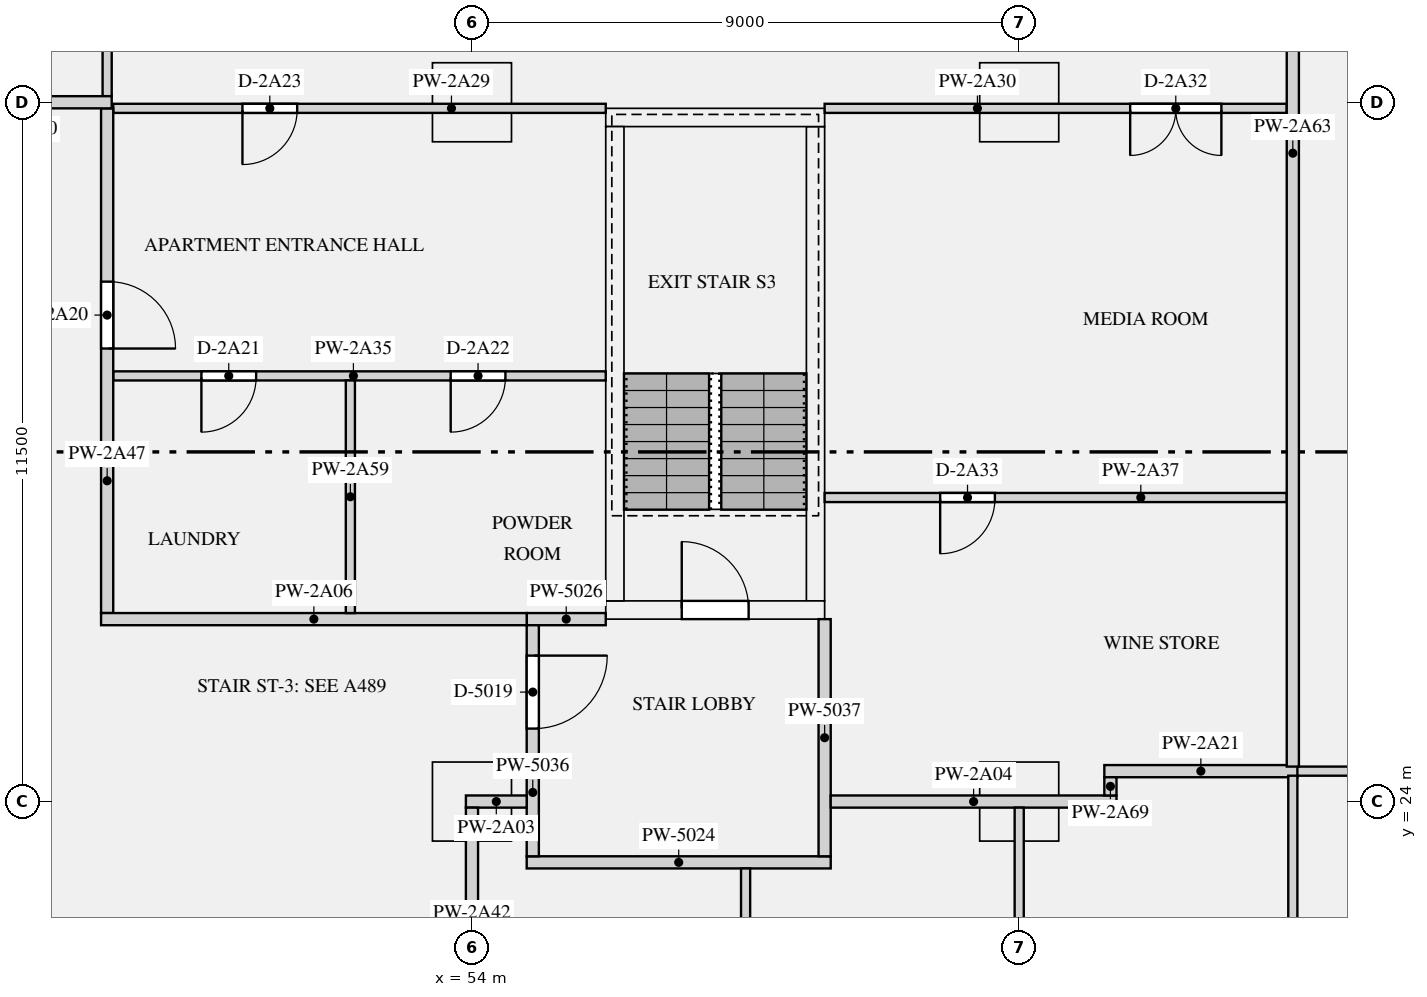
"""IFC4 building model, lengths in metres.
Left out: names, types, materials, properties, quantities, classifications, styles, units other than length and angle.
Written with IfcOpenShell. Run it as: python <this file> out.ifc"""

import sys

from ifc_helpers import new_model, si_unit, direction, frame, frame_2d, origin, origin_2d, place, context, subcontext, project, spatial, rectangle, extrude, element, fill, save


model = new_model("IFC4")
c1 = context("Model", 3, precision=1e-05, world=origin(), true_north=direction((0.0, 1.0)))
c2 = subcontext(c1, "Body", "Model", "MODEL_VIEW")
j1 = project(units=[si_unit("LENGTHUNIT", "METRE"), si_unit("PLANEANGLEUNIT", "RADIAN")], contexts=[c1])
p1 = place(None, origin())
s1 = spatial("IfcSite", under=j1, at=p1, CompositionType="ELEMENT")
p2 = place(p1, origin())
s2 = spatial("IfcBuilding", under=s1, at=p2, CompositionType="ELEMENT")
p3 = place(p2, frame((0.0, 0.0, 83.55)))
s3 = spatial("IfcBuildingStorey", under=s2, at=p3, CompositionType="ELEMENT", Elevation=83.55)
for number, where, z_axis, x_axis in (
    (1, (54.0, 24.0, 0.0), (0.0, 0.0, 1.0), (1.0, 0.0, 0.0)),
    (2, (63.0, 24.0, 0.0), (0.0, 0.0, 1.0), (1.0, 0.0, 0.0)),
    (3, (54.0, 35.5, 0.0), (0.0, 0.0, 1.0), (1.0, 0.0, 0.0)),
    (4, (63.0, 35.5, 0.0), (0.0, 0.0, 1.0), (1.0, 0.0, 0.0)),
):
    element("IfcColumn", number, at=place(p3, frame(where, z_axis=z_axis, x_axis=x_axis)), inside=s3, PredefinedType="COLUMN", context=c2, shape_type="SweptSolid", body=[
        extrude(rectangle(XDim=1.3, YDim=1.3, at=origin_2d()), origin(), (0.0, 0.0, 1.0), 3.15),
    ])
p4 = place(p3, frame((56.2, 27.15, 0.0), z_axis=(0.0, 0.0, 1.0), x_axis=(1.0, 0.0, 0.0)))
e5 = element("IfcWall", 5, at=p4, inside=s3, PredefinedType="SHEAR", context=c2, shape_type="SweptSolid", body=[
    extrude(rectangle(XDim=3.6, YDim=0.3, at=frame_2d((1.8, 0.0))), origin(), (0.0, 0.0, 1.0), 3.15),
])
p5 = place(p4, frame((1.25, 0.0, 0.0)))
e6 = element("IfcOpeningElement", 6, at=p5, cuts=e5, PredefinedType="OPENING", context=c2, shape_type="SweptSolid", body=[
    extrude(rectangle(XDim=1.1, YDim=2.1, at=frame_2d((0.55, 1.05))), frame((0.0, 0.16, 0.0), z_axis=(0.0, -1.0, 0.0), x_axis=(1.0, 0.0, 0.0)), (0.0, 0.0, 1.0), 0.32),
])
p6 = place(p3, frame((56.2, 35.25, 0.0), z_axis=(0.0, 0.0, 1.0), x_axis=(1.0, 0.0, 0.0)))
e7 = element("IfcWall", 7, at=p6, inside=s3, PredefinedType="SHEAR", context=c2, shape_type="SweptSolid", body=[
    extrude(rectangle(XDim=3.6, YDim=0.3, at=frame_2d((1.8, 0.0))), origin(), (0.0, 0.0, 1.0), 3.15),
])
for number, where, z_axis, x_axis in (
    (8, (56.35, 27.3, 0.0), (0.0, 0.0, 1.0), (0.0, 1.0, 0.0)),
    (9, (59.65, 27.3, 0.0), (0.0, 0.0, 1.0), (0.0, 1.0, 0.0)),
):
    element("IfcWall", number, at=place(p3, frame(where, z_axis=z_axis, x_axis=x_axis)), inside=s3, PredefinedType="SHEAR", context=c2, shape_type="SweptSolid", body=[
        extrude(rectangle(XDim=7.8, YDim=0.3, at=frame_2d((3.9, 0.0))), origin(), (0.0, 0.0, 1.0), 3.15),
    ])
p7 = place(p3, frame((54.9, 23.0, 0.0), z_axis=(0.0, 0.0, 1.0), x_axis=(1.0, 0.0, 0.0)))
e10 = element("IfcWall", 10, at=p7, inside=s3, PredefinedType="PARTITIONING", context=c2, shape_type="SweptSolid", body=[
    extrude(rectangle(XDim=5.0, YDim=0.2, at=frame_2d((2.5, 0.0))), origin(), (0.0, 0.0, 1.0), 2.83),
])
p8 = place(p3, frame((54.9, 27.0, 0.0), z_axis=(0.0, 0.0, 1.0), x_axis=(1.0, 0.0, 0.0)))
e11 = element("IfcWall", 11, at=p8, inside=s3, PredefinedType="PARTITIONING", context=c2, shape_type="SweptSolid", body=[
    extrude(rectangle(XDim=1.3, YDim=0.2, at=frame_2d((0.65, 0.0))), origin(), (0.0, 0.0, 1.0), 2.83),
])
p9 = place(p3, frame((55.0, 23.1, 0.0), z_axis=(0.0, 0.0, 1.0), x_axis=(0.0, 1.0, 0.0)))
e12 = element("IfcWall", 12, at=p9, inside=s3, PredefinedType="PARTITIONING", context=c2, shape_type="SweptSolid", body=[
    extrude(rectangle(XDim=3.8, YDim=0.2, at=frame_2d((1.9, 0.0))), origin(), (0.0, 0.0, 1.0), 2.83),
])
p10 = place(p9, frame((2.1, 0.0, 0.0)))
e13 = element("IfcOpeningElement", 13, at=p10, cuts=e12, PredefinedType="OPENING", context=c2, shape_type="SweptSolid", body=[
    extrude(rectangle(XDim=1.2, YDim=2.1, at=frame_2d((0.6, 1.05))), frame((0.0, 0.11, 0.0), z_axis=(0.0, -1.0, 0.0), x_axis=(1.0, 0.0, 0.0)), (0.0, 0.0, 1.0), 0.22),
])
p11 = place(p3, frame((59.8, 23.1, 0.0), z_axis=(0.0, 0.0, 1.0), x_axis=(0.0, 1.0, 0.0)))
e14 = element("IfcWall", 14, at=p11, inside=s3, PredefinedType="PARTITIONING", context=c2, shape_type="SweptSolid", body=[
    extrude(rectangle(XDim=3.9, YDim=0.2, at=frame_2d((1.95, 0.0))), origin(), (0.0, 0.0, 1.0), 2.83),
])
p12 = place(p3, frame((53.9, 24.0, 0.0), z_axis=(0.0, 0.0, 1.0), x_axis=(1.0, 0.0, 0.0)))
e15 = element("IfcWall", 15, at=p12, inside=s3, PredefinedType="PARTITIONING", context=c2, shape_type="SweptSolid", body=[
    extrude(rectangle(XDim=1.0, YDim=0.2, at=frame_2d((0.5, 0.0))), origin(), (0.0, 0.0, 1.0), 2.83),
])
p13 = place(p3, frame((59.9, 24.0, 0.0), z_axis=(0.0, 0.0, 1.0), x_axis=(1.0, 0.0, 0.0)))
e16 = element("IfcWall", 16, at=p13, inside=s3, PredefinedType="PARTITIONING", context=c2, shape_type="SweptSolid", body=[
    extrude(rectangle(XDim=4.7, YDim=0.2, at=frame_2d((2.35, 0.0))), origin(), (0.0, 0.0, 1.0), 2.83),
])
p14 = place(p3, frame((47.9, 27.0, 0.0), z_axis=(0.0, 0.0, 1.0), x_axis=(1.0, 0.0, 0.0)))
e17 = element("IfcWall", 17, at=p14, inside=s3, PredefinedType="PARTITIONING", context=c2, shape_type="SweptSolid", body=[
    extrude(rectangle(XDim=7.0, YDim=0.2, at=frame_2d((3.5, 0.0))), origin(), (0.0, 0.0, 1.0), 2.83),
])
p15 = place(p3, frame((45.0, 35.5, 0.0), z_axis=(0.0, 0.0, 1.0), x_axis=(1.0, 0.0, 0.0)))
e18 = element("IfcWall", 18, at=p15, inside=s3, PredefinedType="PARTITIONING", context=c2, shape_type="SweptSolid", body=[
    extrude(rectangle(XDim=3.075, YDim=0.2, at=frame_2d((1.538, 0.0))), origin(), (0.0, 0.0, 1.0), 2.83),
])
p16 = place(p3, frame((67.425, 24.5, 0.0), z_axis=(0.0, 0.0, 1.0), x_axis=(1.0, 0.0, 0.0)))
e19 = element("IfcWall", 19, at=p16, inside=s3, PredefinedType="PARTITIONING", context=c2, shape_type="SweptSolid", body=[
    extrude(rectangle(XDim=4.65, YDim=0.15, at=frame_2d((2.325, 0.0))), origin(), (0.0, 0.0, 1.0), 2.83),
])
p17 = place(p16, frame((1.25, 0.0, 0.0)))
e20 = element("IfcOpeningElement", 20, at=p17, cuts=e19, PredefinedType="OPENING", context=c2, shape_type="SweptSolid", body=[
    extrude(rectangle(XDim=1.5, YDim=2.1, at=frame_2d((0.75, 1.05))), frame((0.0, 0.085, 0.0), z_axis=(0.0, -1.0, 0.0), x_axis=(1.0, 0.0, 0.0)), (0.0, 0.0, 1.0), 0.17),
])
p18 = place(p3, frame((64.4, 24.5, 0.0), z_axis=(0.0, 0.0, 1.0), x_axis=(1.0, 0.0, 0.0)))
e21 = element("IfcWall", 21, at=p18, inside=s3, PredefinedType="PARTITIONING", context=c2, shape_type="SweptSolid", body=[
    extrude(rectangle(XDim=3.175, YDim=0.2, at=frame_2d((1.587, 0.0))), origin(), (0.0, 0.0, 1.0), 2.83),
])
p19 = place(p3, frame((48.1, 35.4, 0.0), z_axis=(0.0, 0.0, 1.0), x_axis=(1.0, 0.0, 0.0)))
e22 = element("IfcWall", 22, at=p19, inside=s3, PredefinedType="PARTITIONING", context=c2, shape_type="SweptSolid", body=[
    extrude(rectangle(XDim=8.1, YDim=0.15, at=frame_2d((4.05, 0.0))), origin(), (0.0, 0.0, 1.0), 2.83),
])
p20 = place(p19, frame((2.125, 0.0, 0.0)))
e23 = element("IfcOpeningElement", 23, at=p20, cuts=e22, PredefinedType="OPENING", context=c2, shape_type="SweptSolid", body=[
    extrude(rectangle(XDim=0.9, YDim=2.1, at=frame_2d((0.45, 1.05))), frame((0.0, 0.085, 0.0), z_axis=(0.0, -1.0, 0.0), x_axis=(1.0, 0.0, 0.0)), (0.0, 0.0, 1.0), 0.17),
])
p21 = place(p3, frame((59.8, 35.4, 0.0), z_axis=(0.0, 0.0, 1.0), x_axis=(1.0, 0.0, 0.0)))
e24 = element("IfcWall", 24, at=p21, inside=s3, PredefinedType="PARTITIONING", context=c2, shape_type="SweptSolid", body=[
    extrude(rectangle(XDim=7.6, YDim=0.15, at=frame_2d((3.8, 0.0))), origin(), (0.0, 0.0, 1.0), 2.83),
])
p22 = place(p21, frame((5.025, 0.0, 0.0)))
e25 = element("IfcOpeningElement", 25, at=p22, cuts=e24, PredefinedType="OPENING", context=c2, shape_type="SweptSolid", body=[
    extrude(rectangle(XDim=1.5, YDim=2.1, at=frame_2d((0.75, 1.05))), frame((0.0, 0.085, 0.0), z_axis=(0.0, -1.0, 0.0), x_axis=(1.0, 0.0, 0.0)), (0.0, 0.0, 1.0), 0.17),
])
p23 = place(p3, frame((48.1, 31.0, 0.0), z_axis=(0.0, 0.0, 1.0), x_axis=(1.0, 0.0, 0.0)))
e26 = element("IfcWall", 26, at=p23, inside=s3, PredefinedType="PARTITIONING", context=c2, shape_type="SweptSolid", body=[
    extrude(rectangle(XDim=8.1, YDim=0.15, at=frame_2d((4.05, 0.0))), origin(), (0.0, 0.0, 1.0), 2.83),
])
p24 = place(p23, frame((1.45, 0.0, 0.0)))
e27 = element("IfcOpeningElement", 27, at=p24, cuts=e26, PredefinedType="OPENING", context=c2, shape_type="SweptSolid", body=[
    extrude(rectangle(XDim=0.9, YDim=2.1, at=frame_2d((0.45, 1.05))), frame((0.0, 0.085, 0.0), z_axis=(0.0, -1.0, 0.0), x_axis=(1.0, 0.0, 0.0)), (0.0, 0.0, 1.0), 0.17),
])
p25 = place(p23, frame((5.55, 0.0, 0.0)))
e28 = element("IfcOpeningElement", 28, at=p25, cuts=e26, PredefinedType="OPENING", context=c2, shape_type="SweptSolid", body=[
    extrude(rectangle(XDim=0.9, YDim=2.1, at=frame_2d((0.45, 1.05))), frame((0.0, 0.085, 0.0), z_axis=(0.0, -1.0, 0.0), x_axis=(1.0, 0.0, 0.0)), (0.0, 0.0, 1.0), 0.17),
])
p26 = place(p3, frame((59.8, 29.0, 0.0), z_axis=(0.0, 0.0, 1.0), x_axis=(1.0, 0.0, 0.0)))
e29 = element("IfcWall", 29, at=p26, inside=s3, PredefinedType="PARTITIONING", context=c2, shape_type="SweptSolid", body=[
    extrude(rectangle(XDim=7.6, YDim=0.15, at=frame_2d((3.8, 0.0))), origin(), (0.0, 0.0, 1.0), 2.83),
])
p27 = place(p26, frame((1.9, 0.0, 0.0)))
e30 = element("IfcOpeningElement", 30, at=p27, cuts=e29, PredefinedType="OPENING", context=c2, shape_type="SweptSolid", body=[
    extrude(rectangle(XDim=0.9, YDim=2.1, at=frame_2d((0.45, 1.05))), frame((0.0, 0.085, 0.0), z_axis=(0.0, -1.0, 0.0), x_axis=(1.0, 0.0, 0.0)), (0.0, 0.0, 1.0), 0.17),
])
p28 = place(p3, frame((54.0, 16.1, 0.0), z_axis=(0.0, 0.0, 1.0), x_axis=(0.0, 1.0, 0.0)))
e31 = element("IfcWall", 31, at=p28, inside=s3, PredefinedType="PARTITIONING", context=c2, shape_type="SweptSolid", body=[
    extrude(rectangle(XDim=7.8, YDim=0.2, at=frame_2d((3.9, 0.0))), origin(), (0.0, 0.0, 1.0), 2.83),
])
p29 = place(p28, frame((2.35, 0.0, 0.0)))
e32 = element("IfcOpeningElement", 32, at=p29, cuts=e31, PredefinedType="OPENING", context=c2, shape_type="SweptSolid", body=[
    extrude(rectangle(XDim=1.1, YDim=2.1, at=frame_2d((0.55, 1.05))), frame((0.0, 0.11, 0.0), z_axis=(0.0, -1.0, 0.0), x_axis=(1.0, 0.0, 0.0)), (0.0, 0.0, 1.0), 0.22),
])
p30 = place(p3, frame((48.0, 35.6, 0.0), z_axis=(0.0, 0.0, 1.0), x_axis=(0.0, 1.0, 0.0)))
e33 = element("IfcWall", 33, at=p30, inside=s3, PredefinedType="PARTITIONING", context=c2, shape_type="SweptSolid", body=[
    extrude(rectangle(XDim=3.125, YDim=0.15, at=frame_2d((1.562, 0.0))), origin(), (0.0, 0.0, 1.0), 2.83),
])
p31 = place(p30, frame((1.1, 0.0, 0.0)))
e34 = element("IfcOpeningElement", 34, at=p31, cuts=e33, PredefinedType="OPENING", context=c2, shape_type="SweptSolid", body=[
    extrude(rectangle(XDim=0.9, YDim=2.1, at=frame_2d((0.45, 1.05))), frame((0.0, 0.085, 0.0), z_axis=(0.0, -1.0, 0.0), x_axis=(1.0, 0.0, 0.0)), (0.0, 0.0, 1.0), 0.17),
])
p32 = place(p3, frame((48.0, 27.1, 0.0), z_axis=(0.0, 0.0, 1.0), x_axis=(0.0, 1.0, 0.0)))
e35 = element("IfcWall", 35, at=p32, inside=s3, PredefinedType="PARTITIONING", context=c2, shape_type="SweptSolid", body=[
    extrude(rectangle(XDim=8.3, YDim=0.2, at=frame_2d((4.15, 0.0))), origin(), (0.0, 0.0, 1.0), 2.83),
])
p33 = place(p32, frame((4.35, 0.0, 0.0)))
e36 = element("IfcOpeningElement", 36, at=p33, cuts=e35, PredefinedType="OPENING", context=c2, shape_type="SweptSolid", body=[
    extrude(rectangle(XDim=1.1, YDim=2.1, at=frame_2d((0.55, 1.05))), frame((0.0, 0.11, 0.0), z_axis=(0.0, -1.0, 0.0), x_axis=(1.0, 0.0, 0.0)), (0.0, 0.0, 1.0), 0.22),
])
p34 = place(p3, frame((52.0, 27.1, 0.0), z_axis=(0.0, 0.0, 1.0), x_axis=(0.0, 1.0, 0.0)))
e37 = element("IfcWall", 37, at=p34, inside=s3, PredefinedType="PARTITIONING", context=c2, shape_type="SweptSolid", body=[
    extrude(rectangle(XDim=3.825, YDim=0.15, at=frame_2d((1.913, 0.0))), origin(), (0.0, 0.0, 1.0), 2.83),
])
p35 = place(p3, frame((67.5, 16.575, 0.0), z_axis=(0.0, 0.0, 1.0), x_axis=(0.0, 1.0, 0.0)))
e38 = element("IfcWall", 38, at=p35, inside=s3, PredefinedType="PARTITIONING", context=c2, shape_type="SweptSolid", body=[
    extrude(rectangle(XDim=7.85, YDim=0.15, at=frame_2d((3.925, 0.0))), origin(), (0.0, 0.0, 1.0), 2.83),
])
p36 = place(p3, frame((67.5, 24.575, 0.0), z_axis=(0.0, 0.0, 1.0), x_axis=(0.0, 1.0, 0.0)))
e39 = element("IfcWall", 39, at=p36, inside=s3, PredefinedType="PARTITIONING", context=c2, shape_type="SweptSolid", body=[
    extrude(rectangle(XDim=20.175, YDim=0.2, at=frame_2d((10.087, 0.0))), origin(), (0.0, 0.0, 1.0), 2.83),
])
p37 = place(p3, frame((58.5, 12.575, 0.0), z_axis=(0.0, 0.0, 1.0), x_axis=(0.0, 1.0, 0.0)))
e40 = element("IfcWall", 40, at=p37, inside=s3, PredefinedType="PARTITIONING", context=c2, shape_type="SweptSolid", body=[
    extrude(rectangle(XDim=10.325, YDim=0.15, at=frame_2d((5.163, 0.0))), origin(), (0.0, 0.0, 1.0), 2.83),
])
p38 = place(p37, frame((4.75, 0.0, 0.0)))
e41 = element("IfcOpeningElement", 41, at=p38, cuts=e40, PredefinedType="OPENING", context=c2, shape_type="SweptSolid", body=[
    extrude(rectangle(XDim=0.9, YDim=2.1, at=frame_2d((0.45, 1.05))), frame((0.0, 0.085, 0.0), z_axis=(0.0, -1.0, 0.0), x_axis=(1.0, 0.0, 0.0)), (0.0, 0.0, 1.0), 0.17),
])
p39 = place(p3, frame((63.0, 12.575, 0.0), z_axis=(0.0, 0.0, 1.0), x_axis=(0.0, 1.0, 0.0)))
e42 = element("IfcWall", 42, at=p39, inside=s3, PredefinedType="PARTITIONING", context=c2, shape_type="SweptSolid", body=[
    extrude(rectangle(XDim=11.325, YDim=0.15, at=frame_2d((5.663, 0.0))), origin(), (0.0, 0.0, 1.0), 2.83),
])
p40 = place(p39, frame((1.8, 0.0, 0.0)))
e43 = element("IfcOpeningElement", 43, at=p40, cuts=e42, PredefinedType="OPENING", context=c2, shape_type="SweptSolid", body=[
    extrude(rectangle(XDim=0.9, YDim=2.1, at=frame_2d((0.45, 1.05))), frame((0.0, 0.085, 0.0), z_axis=(0.0, -1.0, 0.0), x_axis=(1.0, 0.0, 0.0)), (0.0, 0.0, 1.0), 0.17),
])
p41 = place(p39, frame((6.9, 0.0, 0.0)))
e44 = element("IfcOpeningElement", 44, at=p41, cuts=e42, PredefinedType="OPENING", context=c2, shape_type="SweptSolid", body=[
    extrude(rectangle(XDim=0.9, YDim=2.1, at=frame_2d((0.45, 1.05))), frame((0.0, 0.085, 0.0), z_axis=(0.0, -1.0, 0.0), x_axis=(1.0, 0.0, 0.0)), (0.0, 0.0, 1.0), 0.17),
])
p42 = place(p3, frame((64.5, 24.1, 0.0), z_axis=(0.0, 0.0, 1.0), x_axis=(0.0, 1.0, 0.0)))
e45 = element("IfcWall", 45, at=p42, inside=s3, PredefinedType="PARTITIONING", context=c2, shape_type="SweptSolid", body=[
    extrude(rectangle(XDim=0.3, YDim=0.2, at=frame_2d((0.15, 0.0))), origin(), (0.0, 0.0, 1.0), 2.83),
])
p43 = place(p5, origin())
e46 = element("IfcDoor", 46, at=p43, inside=s3, OperationType="SINGLE_SWING_LEFT", PredefinedType="DOOR", context=c2, shape_type="SweptSolid", body=[
    extrude(rectangle(XDim=1.1, YDim=2.1, at=frame_2d((0.55, 1.05))), frame((0.0, 0.025, 0.0), z_axis=(0.0, -1.0, 0.0), x_axis=(1.0, 0.0, 0.0)), (0.0, 0.0, 1.0), 0.05),
])
fill(e6, e46)
p44 = place(p10, frame((1.2, 0.0, 0.0), z_axis=(0.0, 0.0, 1.0), x_axis=(-1.0, 0.0, 0.0)))
e47 = element("IfcDoor", 47, at=p44, inside=s3, OperationType="SINGLE_SWING_LEFT", PredefinedType="DOOR", context=c2, shape_type="SweptSolid", body=[
    extrude(rectangle(XDim=1.2, YDim=2.1, at=frame_2d((0.6, 1.05))), frame((0.0, 0.025, 0.0), z_axis=(0.0, -1.0, 0.0), x_axis=(1.0, 0.0, 0.0)), (0.0, 0.0, 1.0), 0.05),
])
fill(e13, e47)
p45 = place(p33, frame((1.1, 0.0, 0.0), z_axis=(0.0, 0.0, 1.0), x_axis=(-1.0, 0.0, 0.0)))
e48 = element("IfcDoor", 48, at=p45, inside=s3, OperationType="SINGLE_SWING_RIGHT", PredefinedType="DOOR", context=c2, shape_type="SweptSolid", body=[
    extrude(rectangle(XDim=1.1, YDim=2.1, at=frame_2d((0.55, 1.05))), frame((0.0, 0.025, 0.0), z_axis=(0.0, -1.0, 0.0), x_axis=(1.0, 0.0, 0.0)), (0.0, 0.0, 1.0), 0.05),
])
fill(e36, e48)
p46 = place(p24, frame((0.9, 0.0, 0.0), z_axis=(0.0, 0.0, 1.0), x_axis=(-1.0, 0.0, 0.0)))
e49 = element("IfcDoor", 49, at=p46, inside=s3, OperationType="SINGLE_SWING_RIGHT", PredefinedType="DOOR", context=c2, shape_type="SweptSolid", body=[
    extrude(rectangle(XDim=0.9, YDim=2.1, at=frame_2d((0.45, 1.05))), frame((0.0, 0.025, 0.0), z_axis=(0.0, -1.0, 0.0), x_axis=(1.0, 0.0, 0.0)), (0.0, 0.0, 1.0), 0.05),
])
fill(e27, e49)
p47 = place(p25, frame((0.9, 0.0, 0.0), z_axis=(0.0, 0.0, 1.0), x_axis=(-1.0, 0.0, 0.0)))
e50 = element("IfcDoor", 50, at=p47, inside=s3, OperationType="SINGLE_SWING_RIGHT", PredefinedType="DOOR", context=c2, shape_type="SweptSolid", body=[
    extrude(rectangle(XDim=0.9, YDim=2.1, at=frame_2d((0.45, 1.05))), frame((0.0, 0.025, 0.0), z_axis=(0.0, -1.0, 0.0), x_axis=(1.0, 0.0, 0.0)), (0.0, 0.0, 1.0), 0.05),
])
fill(e28, e50)
p48 = place(p20, frame((0.9, 0.0, 0.0), z_axis=(0.0, 0.0, 1.0), x_axis=(-1.0, 0.0, 0.0)))
e51 = element("IfcDoor", 51, at=p48, inside=s3, OperationType="SINGLE_SWING_RIGHT", PredefinedType="DOOR", context=c2, shape_type="SweptSolid", body=[
    extrude(rectangle(XDim=0.9, YDim=2.1, at=frame_2d((0.45, 1.05))), frame((0.0, 0.025, 0.0), z_axis=(0.0, -1.0, 0.0), x_axis=(1.0, 0.0, 0.0)), (0.0, 0.0, 1.0), 0.05),
])
fill(e23, e51)
p49 = place(p22, frame((1.5, 0.0, 0.0), z_axis=(0.0, 0.0, 1.0), x_axis=(-1.0, 0.0, 0.0)))
e52 = element("IfcDoor", 52, at=p49, inside=s3, OperationType="DOUBLE_DOOR_SINGLE_SWING", PredefinedType="DOOR", context=c2, shape_type="SweptSolid", body=[
    extrude(rectangle(XDim=1.5, YDim=2.1, at=frame_2d((0.75, 1.05))), frame((0.0, 0.025, 0.0), z_axis=(0.0, -1.0, 0.0), x_axis=(1.0, 0.0, 0.0)), (0.0, 0.0, 1.0), 0.05),
])
fill(e25, e52)
p50 = place(p27, frame((0.9, 0.0, 0.0), z_axis=(0.0, 0.0, 1.0), x_axis=(-1.0, 0.0, 0.0)))
e53 = element("IfcDoor", 53, at=p50, inside=s3, OperationType="SINGLE_SWING_RIGHT", PredefinedType="DOOR", context=c2, shape_type="SweptSolid", body=[
    extrude(rectangle(XDim=0.9, YDim=2.1, at=frame_2d((0.45, 1.05))), frame((0.0, 0.025, 0.0), z_axis=(0.0, -1.0, 0.0), x_axis=(1.0, 0.0, 0.0)), (0.0, 0.0, 1.0), 0.05),
])
fill(e30, e53)
save(model, sys.argv[1])
